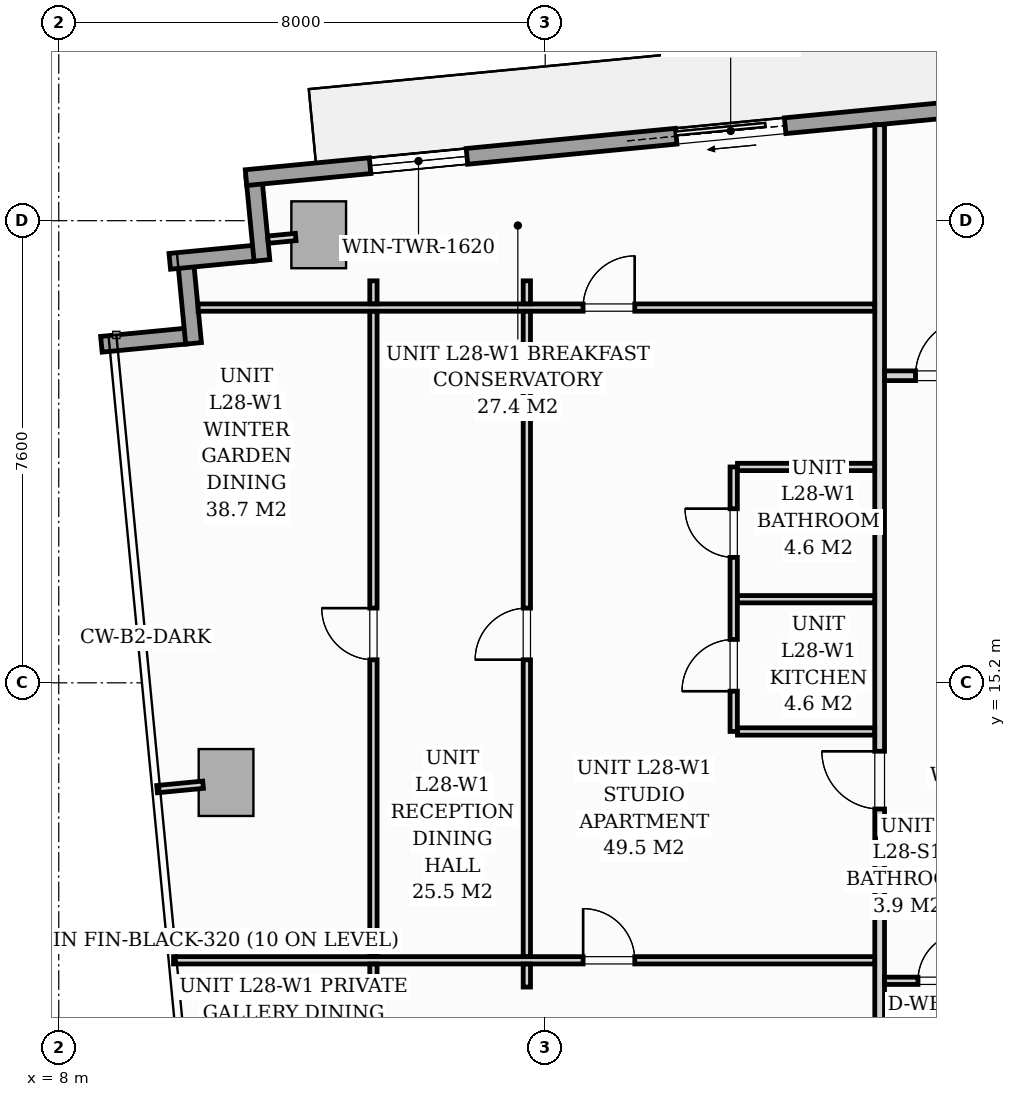
"""IFC4 building model, lengths in metres.
Left out: names, types, materials, properties, quantities, classifications, styles, units other than length and angle.
Written with IfcOpenShell. Run it as: python <this file> out.ifc"""

import sys

from ifc_helpers import new_model, si_unit, direction, frame, frame_2d, origin, origin_2d, place, context, subcontext, project, spatial, rectangle, extrude, source, transform, mapped, element, fill, save


model = new_model("IFC4")
c1 = context("Model", 3, precision=1e-05, world=origin(), true_north=direction((0.0, 1.0)))
c2 = subcontext(c1, "Body", "Model", "MODEL_VIEW")
j1 = project(units=[si_unit("LENGTHUNIT", "METRE"), si_unit("PLANEANGLEUNIT", "RADIAN")], contexts=[c1])
p1 = place(None, origin())
s1 = spatial("IfcSite", under=j1, at=p1, CompositionType="ELEMENT")
p2 = place(p1, origin())
s2 = spatial("IfcBuilding", under=s1, at=p2, CompositionType="ELEMENT")
p3 = place(p2, frame((0.0, 0.0, 100.2)))
s3 = spatial("IfcBuildingStorey", under=s2, at=p3, CompositionType="ELEMENT", Elevation=100.2)
m1 = source(origin(), c2, "Body", "SweptSolid", [
    extrude(rectangle(XDim=0.9, YDim=1.1, at=origin_2d()), origin(), (0.0, 0.0, 1.0), 3.196),
])
for number, where, z_axis, x_axis in (
    (1, (12.275, 22.568, 0.002), (0.0, 0.0, 1.0), (0.995, 0.096, 0.0)),
    (2, (10.752, 13.561, 0.002), (0.0, 0.0, 1.0), (0.995, 0.096, 0.0)),
):
    element("IfcColumn", number, at=place(p3, frame(where, z_axis=z_axis, x_axis=x_axis)), inside=s3, PredefinedType="COLUMN", context=c2, shape_type="MappedRepresentation", body=[
        mapped(m1, transform((0.0, 0.0, 0.0), scale=1.0)),
    ])
for number, where, z_axis, x_axis in (
    (3, (8.701, 20.767, 0.0), (0.0, 0.0, 1.0), (0.995, 0.096, 0.0)),
    (4, (10.217, 20.783, 0.0), (0.0, 0.0, 1.0), (-0.096, 0.995, 0.0)),
):
    element("IfcWall", number, at=place(p3, frame(where, z_axis=z_axis, x_axis=x_axis)), inside=s3, PredefinedType="STANDARD", context=c2, shape_type="SweptSolid", body=[
        extrude(rectangle(XDim=1.395, YDim=0.26, at=frame_2d((0.698, 0.0))), origin(), (0.0, 0.0, 1.0), 2.94),
    ])
p4 = place(p3, frame((9.826, 22.131, 0.0), z_axis=(0.0, 0.0, 1.0), x_axis=(0.995389446633, 0.095915846097, 0.0)))
e5 = element("IfcWall", 5, at=p4, inside=s3, PredefinedType="STANDARD", context=c2, shape_type="SweptSolid", body=[
    extrude(rectangle(XDim=1.395, YDim=0.26, at=frame_2d((0.697, 0.0))), origin(), (0.0, 0.0, 1.0), 2.94),
])
p5 = place(p3, frame((11.341, 22.147, 0.0), z_axis=(0.0, 0.0, 1.0), x_axis=(-0.09589913835, 0.995391056452, 0.0)))
e6 = element("IfcWall", 6, at=p5, inside=s3, PredefinedType="STANDARD", context=c2, shape_type="SweptSolid", body=[
    extrude(rectangle(XDim=1.395, YDim=0.26, at=frame_2d((0.698, 0.0))), origin(), (0.0, 0.0, 1.0), 2.94),
])
p6 = place(p3, frame((11.08, 23.508, 0.0), z_axis=(0.0, 0.0, 1.0), x_axis=(0.995396638587, 0.095841180552, 0.0)))
e7 = element("IfcWall", 7, at=p6, inside=s3, PredefinedType="STANDARD", context=c2, shape_type="SweptSolid", body=[
    extrude(rectangle(XDim=19.11, YDim=0.26, at=frame_2d((9.555, 0.0))), origin(), (0.0, 0.0, 1.0), 2.94),
])
p7 = place(p6, frame((7.107, 0.0, 0.0)))
e8 = element("IfcOpeningElement", 8, at=p7, cuts=e7, PredefinedType="OPENING", context=c2, shape_type="SweptSolid", body=[
    extrude(rectangle(XDim=1.8, YDim=2.06, at=frame_2d((0.9, 1.03))), frame((0.0, 0.14, 0.0), z_axis=(0.0, -1.0, 0.0), x_axis=(1.0, 0.0, 0.0)), (0.0, 0.0, 1.0), 0.28),
])
p8 = place(p6, frame((2.05, 0.0, 0.65)))
e9 = element("IfcOpeningElement", 9, at=p8, cuts=e7, PredefinedType="OPENING", context=c2, shape_type="SweptSolid", body=[
    extrude(rectangle(XDim=1.6, YDim=1.5, at=frame_2d((0.8, 0.75))), frame((0.0, 0.14, 0.0), z_axis=(0.0, -1.0, 0.0), x_axis=(1.0, 0.0, 0.0)), (0.0, 0.0, 1.0), 0.28),
])
p9 = place(p3, frame((21.5, 12.55, 0.0), z_axis=(0.0, 0.0, 1.0), x_axis=(1.0, 0.0, 0.0)))
e10 = element("IfcWall", 10, at=p9, inside=s3, PredefinedType="PARTITIONING", context=c2, shape_type="SweptSolid", body=[
    extrude(rectangle(XDim=24.38, YDim=0.16, at=frame_2d((12.19, 0.0))), origin(), (0.0, 0.0, 1.0), 2.94),
])
p10 = place(p9, frame((6.075, 0.0, 0.0)))
e11 = element("IfcOpeningElement", 11, at=p10, cuts=e10, PredefinedType="OPENING", context=c2, shape_type="SweptSolid", body=[
    extrude(rectangle(XDim=0.95, YDim=2.06, at=frame_2d((0.475, 1.03))), frame((0.0, 0.09, 0.0), z_axis=(0.0, -1.0, 0.0), x_axis=(1.0, 0.0, 0.0)), (0.0, 0.0, 1.0), 0.18),
])
p11 = place(p9, frame((10.519, 0.0, 0.0)))
e12 = element("IfcOpeningElement", 12, at=p11, cuts=e10, PredefinedType="OPENING", context=c2, shape_type="SweptSolid", body=[
    extrude(rectangle(XDim=0.95, YDim=2.06, at=frame_2d((0.475, 1.03))), frame((0.0, 0.09, 0.0), z_axis=(0.0, -1.0, 0.0), x_axis=(1.0, 0.0, 0.0)), (0.0, 0.0, 1.0), 0.18),
])
p12 = place(p9, frame((18.208, 0.0, 0.0)))
e13 = element("IfcOpeningElement", 13, at=p12, cuts=e10, PredefinedType="OPENING", context=c2, shape_type="SweptSolid", body=[
    extrude(rectangle(XDim=0.95, YDim=2.06, at=frame_2d((0.475, 1.03))), frame((0.0, 0.09, 0.0), z_axis=(0.0, -1.0, 0.0), x_axis=(1.0, 0.0, 0.0)), (0.0, 0.0, 1.0), 0.18),
])
p13 = place(p3, frame((21.5, 4.812, 0.0), z_axis=(0.0, 0.0, 1.0), x_axis=(0.0, 1.0, 0.0)))
e14 = element("IfcWall", 14, at=p13, inside=s3, PredefinedType="PARTITIONING", context=c2, shape_type="SweptSolid", body=[
    extrude(rectangle(XDim=7.656, YDim=0.16, at=frame_2d((3.828, 0.0))), origin(), (0.0, 0.0, 1.0), 2.94),
])
p14 = place(p3, frame((21.5, 12.632, 0.0), z_axis=(0.0, 0.0, 1.0), x_axis=(0.0, 1.0, 0.0)))
e15 = element("IfcWall", 15, at=p14, inside=s3, PredefinedType="PARTITIONING", context=c2, shape_type="SweptSolid", body=[
    extrude(rectangle(XDim=11.747, YDim=0.16, at=frame_2d((5.873, 0.0))), origin(), (0.0, 0.0, 1.0), 2.94),
])
p15 = place(p14, frame((0.493, 0.0, 0.0)))
e16 = element("IfcOpeningElement", 16, at=p15, cuts=e15, PredefinedType="OPENING", context=c2, shape_type="SweptSolid", body=[
    extrude(rectangle(XDim=0.95, YDim=2.06, at=frame_2d((0.475, 1.03))), frame((0.0, 0.09, 0.0), z_axis=(0.0, -1.0, 0.0), x_axis=(1.0, 0.0, 0.0)), (0.0, 0.0, 1.0), 0.18),
])
p16 = place(p3, frame((21.582, 10.3, 0.0), z_axis=(0.0, 0.0, 1.0), x_axis=(1.0, 0.0, 0.0)))
e17 = element("IfcWall", 17, at=p16, inside=s3, PredefinedType="PARTITIONING", context=c2, shape_type="SweptSolid", body=[
    extrude(rectangle(XDim=4.098, YDim=0.12, at=frame_2d((2.049, 0.0))), origin(), (0.0, 0.0, 1.0), 2.94),
])
p17 = place(p16, frame((0.548, 0.0, 0.0)))
e18 = element("IfcOpeningElement", 18, at=p17, cuts=e17, PredefinedType="OPENING", context=c2, shape_type="SweptSolid", body=[
    extrude(rectangle(XDim=0.8, YDim=2.02, at=frame_2d((0.4, 1.01))), frame((0.0, 0.07, 0.0), z_axis=(0.0, -1.0, 0.0), x_axis=(1.0, 0.0, 0.0)), (0.0, 0.0, 1.0), 0.14),
])
p18 = place(p16, frame((2.573, 0.0, 0.0)))
e19 = element("IfcOpeningElement", 19, at=p18, cuts=e17, PredefinedType="OPENING", context=c2, shape_type="SweptSolid", body=[
    extrude(rectangle(XDim=0.85, YDim=2.05, at=frame_2d((0.425, 1.025))), frame((0.0, 0.07, 0.0), z_axis=(0.0, -1.0, 0.0), x_axis=(1.0, 0.0, 0.0)), (0.0, 0.0, 1.0), 0.14),
])
p19 = place(p3, frame((19.1, 14.4, 0.0), z_axis=(0.0, 0.0, 1.0), x_axis=(0.0, 1.0, 0.0)))
e20 = element("IfcWall", 20, at=p19, inside=s3, PredefinedType="PARTITIONING", context=c2, shape_type="SweptSolid", body=[
    extrude(rectangle(XDim=4.35, YDim=0.12, at=frame_2d((2.175, 0.0))), origin(), (0.0, 0.0, 1.0), 2.94),
])
p20 = place(p19, frame((0.663, 0.0, 0.0)))
e21 = element("IfcOpeningElement", 21, at=p20, cuts=e20, PredefinedType="OPENING", context=c2, shape_type="SweptSolid", body=[
    extrude(rectangle(XDim=0.85, YDim=2.05, at=frame_2d((0.425, 1.025))), frame((0.0, 0.07, 0.0), z_axis=(0.0, -1.0, 0.0), x_axis=(1.0, 0.0, 0.0)), (0.0, 0.0, 1.0), 0.14),
])
p21 = place(p19, frame((2.863, 0.0, 0.0)))
e22 = element("IfcOpeningElement", 22, at=p21, cuts=e20, PredefinedType="OPENING", context=c2, shape_type="SweptSolid", body=[
    extrude(rectangle(XDim=0.8, YDim=2.02, at=frame_2d((0.4, 1.01))), frame((0.0, 0.07, 0.0), z_axis=(0.0, -1.0, 0.0), x_axis=(1.0, 0.0, 0.0)), (0.0, 0.0, 1.0), 0.14),
])
for number, where, z_axis, x_axis in (
    (23, (19.162, 16.575, 0.0), (0.0, 0.0, 1.0), (1.0, 0.0, 0.0)),
    (24, (19.162, 14.4, 0.0), (0.0, 0.0, 1.0), (1.0, 0.0, 0.0)),
    (25, (19.162, 18.75, 0.0), (0.0, 0.0, 1.0), (1.0, 0.0, 0.0)),
):
    element("IfcWall", number, at=place(p3, frame(where, z_axis=z_axis, x_axis=x_axis)), inside=s3, PredefinedType="PARTITIONING", context=c2, shape_type="SweptSolid", body=[
        extrude(rectangle(XDim=2.256, YDim=0.12, at=frame_2d((1.128, 0.0))), origin(), (0.0, 0.0, 1.0), 2.94),
    ])
p22 = place(p3, frame((10.293, 21.371, 0.0), z_axis=(0.0, 0.0, 1.0), x_axis=(1.0, 0.0, 0.0)))
e26 = element("IfcWall", 26, at=p22, inside=s3, PredefinedType="PARTITIONING", context=c2, shape_type="SweptSolid", body=[
    extrude(rectangle(XDim=11.125, YDim=0.12, at=frame_2d((5.562, 0.0))), origin(), (0.0, 0.0, 1.0), 2.94),
])
p23 = place(p22, frame((6.33, 0.0, 0.0)))
e27 = element("IfcOpeningElement", 27, at=p23, cuts=e26, PredefinedType="OPENING", context=c2, shape_type="SweptSolid", body=[
    extrude(rectangle(XDim=0.85, YDim=2.05, at=frame_2d((0.425, 1.025))), frame((0.0, 0.07, 0.0), z_axis=(0.0, -1.0, 0.0), x_axis=(1.0, 0.0, 0.0)), (0.0, 0.0, 1.0), 0.14),
])
p24 = place(p3, frame((9.888, 10.637, 0.0), z_axis=(0.0, 0.0, 1.0), x_axis=(1.0, 0.0, 0.0)))
e28 = element("IfcWall", 28, at=p24, inside=s3, PredefinedType="PARTITIONING", context=c2, shape_type="SweptSolid", body=[
    extrude(rectangle(XDim=11.53, YDim=0.12, at=frame_2d((5.765, 0.0))), origin(), (0.0, 0.0, 1.0), 2.94),
])
p25 = place(p24, frame((6.735, 0.0, 0.0)))
e29 = element("IfcOpeningElement", 29, at=p25, cuts=e28, PredefinedType="OPENING", context=c2, shape_type="SweptSolid", body=[
    extrude(rectangle(XDim=0.85, YDim=2.05, at=frame_2d((0.425, 1.025))), frame((0.0, 0.07, 0.0), z_axis=(0.0, -1.0, 0.0), x_axis=(1.0, 0.0, 0.0)), (0.0, 0.0, 1.0), 0.14),
])
p26 = place(p3, frame((13.175, 10.197, 0.0), z_axis=(0.0, 0.0, 1.0), x_axis=(0.0, 1.0, 0.0)))
e30 = element("IfcWall", 30, at=p26, inside=s3, PredefinedType="PARTITIONING", context=c2, shape_type="SweptSolid", body=[
    extrude(rectangle(XDim=0.378, YDim=0.12, at=frame_2d((0.189, 0.0))), origin(), (0.0, 0.0, 1.0), 2.94),
])
p27 = place(p3, frame((13.175, 10.699, 0.0), z_axis=(0.0, 0.0, 1.0), x_axis=(0.0, 1.0, 0.0)))
e31 = element("IfcWall", 31, at=p27, inside=s3, PredefinedType="PARTITIONING", context=c2, shape_type="SweptSolid", body=[
    extrude(rectangle(XDim=10.61, YDim=0.12, at=frame_2d((5.305, 0.0))), origin(), (0.0, 0.0, 1.0), 2.94),
])
p28 = place(p27, frame((4.88, 0.0, 0.0)))
e32 = element("IfcOpeningElement", 32, at=p28, cuts=e31, PredefinedType="OPENING", context=c2, shape_type="SweptSolid", body=[
    extrude(rectangle(XDim=0.85, YDim=2.05, at=frame_2d((0.425, 1.025))), frame((0.0, 0.07, 0.0), z_axis=(0.0, -1.0, 0.0), x_axis=(1.0, 0.0, 0.0)), (0.0, 0.0, 1.0), 0.14),
])
for number, where, z_axis, x_axis in (
    (33, (13.175, 21.433, 0.0), (0.0, 0.0, 1.0), (0.0, 1.0, 0.0)),
    (34, (15.698, 10.197, 0.0), (0.0, 0.0, 1.0), (0.0, 1.0, 0.0)),
):
    element("IfcWall", number, at=place(p3, frame(where, z_axis=z_axis, x_axis=x_axis)), inside=s3, PredefinedType="PARTITIONING", context=c2, shape_type="SweptSolid", body=[
        extrude(rectangle(XDim=0.378, YDim=0.12, at=frame_2d((0.189, 0.0))), origin(), (0.0, 0.0, 1.0), 2.94),
    ])
p29 = place(p3, frame((15.698, 10.699, 0.0), z_axis=(0.0, 0.0, 1.0), x_axis=(0.0, 1.0, 0.0)))
e35 = element("IfcWall", 35, at=p29, inside=s3, PredefinedType="PARTITIONING", context=c2, shape_type="SweptSolid", body=[
    extrude(rectangle(XDim=10.61, YDim=0.12, at=frame_2d((5.305, 0.0))), origin(), (0.0, 0.0, 1.0), 2.94),
])
p30 = place(p29, frame((4.88, 0.0, 0.0)))
e36 = element("IfcOpeningElement", 36, at=p30, cuts=e35, PredefinedType="OPENING", context=c2, shape_type="SweptSolid", body=[
    extrude(rectangle(XDim=0.85, YDim=2.05, at=frame_2d((0.425, 1.025))), frame((0.0, 0.07, 0.0), z_axis=(0.0, -1.0, 0.0), x_axis=(1.0, 0.0, 0.0)), (0.0, 0.0, 1.0), 0.14),
])
p31 = place(p3, frame((15.698, 21.433, 0.0), z_axis=(0.0, 0.0, 1.0), x_axis=(0.0, 1.0, 0.0)))
e37 = element("IfcWall", 37, at=p31, inside=s3, PredefinedType="PARTITIONING", context=c2, shape_type="SweptSolid", body=[
    extrude(rectangle(XDim=0.378, YDim=0.12, at=frame_2d((0.189, 0.0))), origin(), (0.0, 0.0, 1.0), 2.94),
])
p32 = place(p3, frame((21.582, 20.25, 0.0), z_axis=(0.0, 0.0, 1.0), x_axis=(1.0, 0.0, 0.0)))
e38 = element("IfcWall", 38, at=p32, inside=s3, PredefinedType="PARTITIONING", context=c2, shape_type="SweptSolid", body=[
    extrude(rectangle(XDim=1.886, YDim=0.16, at=frame_2d((0.943, 0.0))), origin(), (0.0, 0.0, 1.0), 2.94),
])
p33 = place(p32, frame((0.508, 0.0, 0.0)))
e39 = element("IfcOpeningElement", 39, at=p33, cuts=e38, PredefinedType="OPENING", context=c2, shape_type="SweptSolid", body=[
    extrude(rectangle(XDim=0.95, YDim=2.06, at=frame_2d((0.475, 1.03))), frame((0.0, 0.09, 0.0), z_axis=(0.0, -1.0, 0.0), x_axis=(1.0, 0.0, 0.0)), (0.0, 0.0, 1.0), 0.18),
])
p34 = place(p3, frame((11.897, 22.532, 0.0), z_axis=(0.0, 0.0, 1.0), x_axis=(-0.995384576284, -0.09596637586, 0.0)))
e40 = element("IfcWall", 40, at=p34, inside=s3, PredefinedType="PARTITIONING", context=c2, shape_type="SweptSolid", body=[
    extrude(rectangle(XDim=0.458, YDim=0.12, at=frame_2d((0.229, 0.0))), origin(), (0.0, 0.0, 1.0), 2.94),
])
p35 = place(p3, frame((10.373, 13.524, 0.0), z_axis=(0.0, 0.0, 1.0), x_axis=(-0.995377786728, -0.096036772582, 0.0)))
e41 = element("IfcWall", 41, at=p35, inside=s3, PredefinedType="PARTITIONING", context=c2, shape_type="SweptSolid", body=[
    extrude(rectangle(XDim=0.76, YDim=0.12, at=frame_2d((0.38, 0.0))), origin(), (0.0, 0.0, 1.0), 2.94),
])
m2 = source(origin(), c2, "Body", "SweptSolid", [
    extrude(rectangle(XDim=1.8, YDim=2.06, at=frame_2d((0.9, 1.03))), frame((0.0, 0.025, 0.0), z_axis=(0.0, -1.0, 0.0), x_axis=(1.0, 0.0, 0.0)), (0.0, 0.0, 1.0), 0.05),
])
p36 = place(p7, origin())
e42 = element("IfcDoor", 42, at=p36, inside=s3, OperationType="SLIDING_TO_LEFT", PredefinedType="DOOR", context=c2, shape_type="MappedRepresentation", body=[
    mapped(m2, transform((0.0, 0.0, 0.0), scale=1.0)),
])
fill(e8, e42)
m3 = source(origin(), c2, "Body", "SweptSolid", [
    extrude(rectangle(XDim=1.6, YDim=1.5, at=frame_2d((0.8, 0.75))), frame((0.0, 0.03, 0.0), z_axis=(0.0, -1.0, 0.0), x_axis=(1.0, 0.0, 0.0)), (0.0, 0.0, 1.0), 0.06),
])
p37 = place(p8, origin())
e43 = element("IfcWindow", 43, at=p37, inside=s3, PartitioningType="SINGLE_PANEL", PredefinedType="WINDOW", context=c2, shape_type="MappedRepresentation", body=[
    mapped(m3, transform((0.0, 0.0, 0.0), scale=1.0)),
])
fill(e9, e43)
m4 = source(origin(), c2, "Body", "SweptSolid", [
    extrude(rectangle(XDim=0.8, YDim=2.02, at=frame_2d((0.4, 1.01))), frame((0.0, 0.025, 0.0), z_axis=(0.0, -1.0, 0.0), x_axis=(1.0, 0.0, 0.0)), (0.0, 0.0, 1.0), 0.05),
])
p38 = place(p17, origin())
e44 = element("IfcDoor", 44, at=p38, inside=s3, OperationType="SINGLE_SWING_RIGHT", PredefinedType="DOOR", context=c2, shape_type="MappedRepresentation", body=[
    mapped(m4, transform((0.0, 0.0, 0.0), scale=1.0)),
])
fill(e18, e44)
m5 = source(origin(), c2, "Body", "SweptSolid", [
    extrude(rectangle(XDim=0.95, YDim=2.06, at=frame_2d((0.475, 1.03))), frame((0.0, 0.025, 0.0), z_axis=(0.0, -1.0, 0.0), x_axis=(1.0, 0.0, 0.0)), (0.0, 0.0, 1.0), 0.05),
])
p39 = place(p15, origin())
e45 = element("IfcDoor", 45, at=p39, inside=s3, OperationType="SINGLE_SWING_RIGHT", PredefinedType="DOOR", context=c2, shape_type="MappedRepresentation", body=[
    mapped(m5, transform((0.0, 0.0, 0.0), scale=1.0)),
])
fill(e16, e45)
m6 = source(origin(), c2, "Body", "SweptSolid", [
    extrude(rectangle(XDim=0.85, YDim=2.05, at=frame_2d((0.425, 1.025))), frame((0.0, 0.025, 0.0), z_axis=(0.0, -1.0, 0.0), x_axis=(1.0, 0.0, 0.0)), (0.0, 0.0, 1.0), 0.05),
])
p40 = place(p20, origin())
e46 = element("IfcDoor", 46, at=p40, inside=s3, OperationType="SINGLE_SWING_LEFT", PredefinedType="DOOR", context=c2, shape_type="MappedRepresentation", body=[
    mapped(m6, transform((0.0, 0.0, 0.0), scale=1.0)),
])
fill(e21, e46)
p41 = place(p21, origin())
e47 = element("IfcDoor", 47, at=p41, inside=s3, OperationType="SINGLE_SWING_RIGHT", PredefinedType="DOOR", context=c2, shape_type="MappedRepresentation", body=[
    mapped(m4, transform((0.0, 0.0, 0.0), scale=1.0)),
])
fill(e22, e47)
p42 = place(p23, origin())
e48 = element("IfcDoor", 48, at=p42, inside=s3, OperationType="SINGLE_SWING_RIGHT", PredefinedType="DOOR", context=c2, shape_type="MappedRepresentation", body=[
    mapped(m6, transform((0.0, 0.0, 0.0), scale=1.0)),
])
fill(e27, e48)
p43 = place(p25, origin())
e49 = element("IfcDoor", 49, at=p43, inside=s3, OperationType="SINGLE_SWING_LEFT", PredefinedType="DOOR", context=c2, shape_type="MappedRepresentation", body=[
    mapped(m6, transform((0.0, 0.0, 0.0), scale=1.0)),
])
fill(e29, e49)
p44 = place(p28, origin())
e50 = element("IfcDoor", 50, at=p44, inside=s3, OperationType="SINGLE_SWING_RIGHT", PredefinedType="DOOR", context=c2, shape_type="MappedRepresentation", body=[
    mapped(m6, transform((0.0, 0.0, 0.0), scale=1.0)),
])
fill(e32, e50)
p45 = place(p30, origin())
e51 = element("IfcDoor", 51, at=p45, inside=s3, OperationType="SINGLE_SWING_LEFT", PredefinedType="DOOR", context=c2, shape_type="MappedRepresentation", body=[
    mapped(m6, transform((0.0, 0.0, 0.0), scale=1.0)),
])
fill(e36, e51)
p46 = place(p33, origin())
e52 = element("IfcDoor", 52, at=p46, inside=s3, OperationType="SINGLE_SWING_RIGHT", PredefinedType="DOOR", context=c2, shape_type="MappedRepresentation", body=[
    mapped(m5, transform((0.0, 0.0, 0.0), scale=1.0)),
])
fill(e39, e52)
save(model, sys.argv[1])
